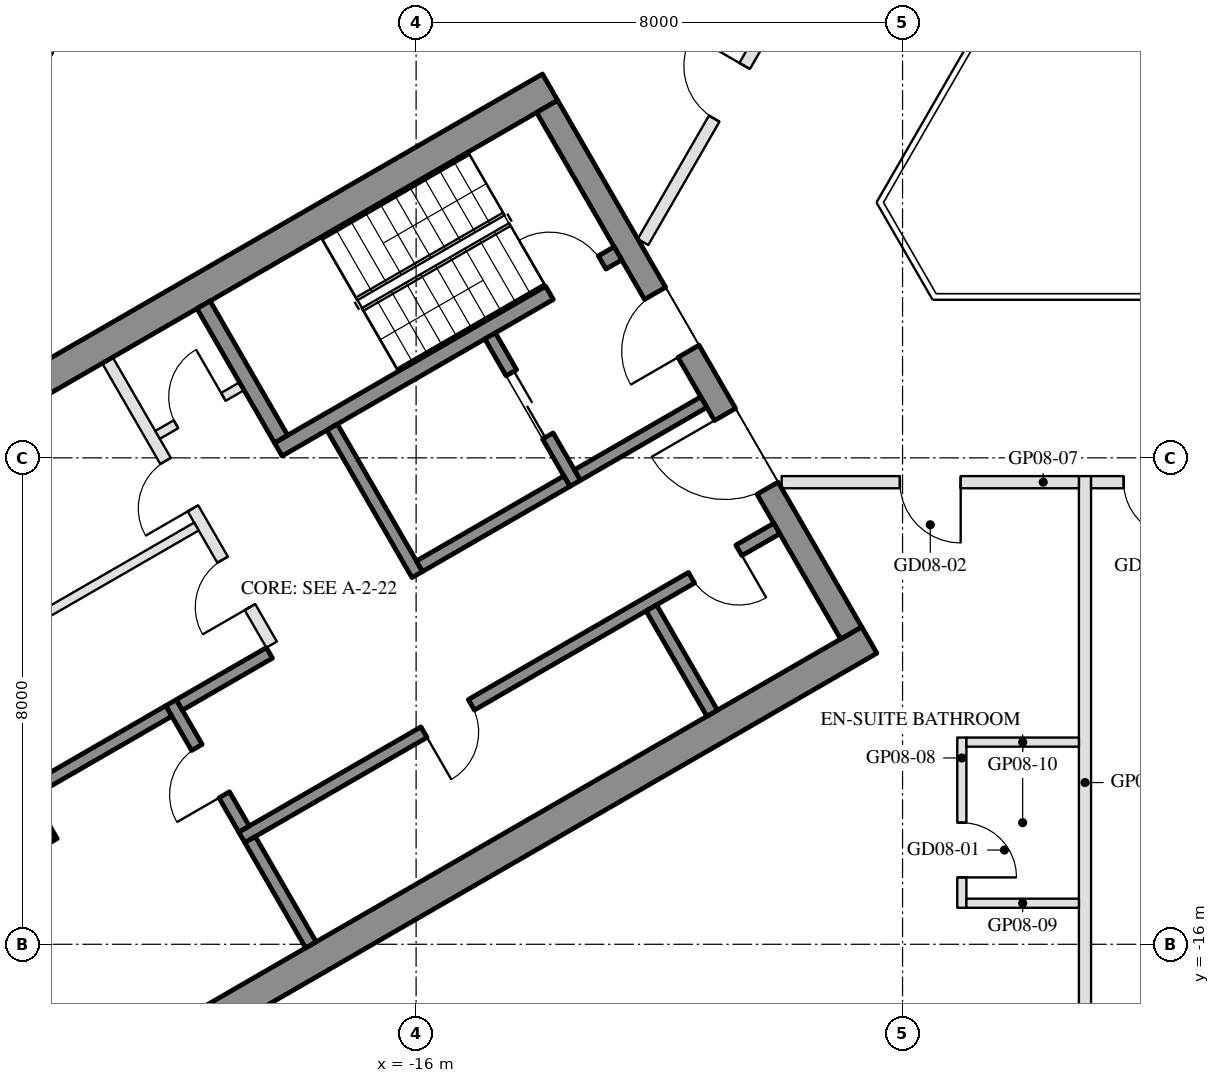
"""IFC4 building model, lengths in metres.
Left out: names, types, materials, properties, quantities, classifications, styles, units other than length and angle.
Written with IfcOpenShell. Run it as: python <this file> out.ifc"""

import sys

from ifc_helpers import new_model, si_unit, direction, frame, frame_2d, origin, origin_2d, place, context, subcontext, project, spatial, rectangle, hollow_rectangle, extrude, element, fill, save


model = new_model("IFC4")
c1 = context("Model", 3, precision=1e-05, world=origin(), true_north=direction((0.0, 1.0)))
c2 = subcontext(c1, "Body", "Model", "MODEL_VIEW")
j1 = project(units=[si_unit("LENGTHUNIT", "METRE"), si_unit("PLANEANGLEUNIT", "RADIAN")], contexts=[c1])
p1 = place(None, origin())
s1 = spatial("IfcSite", under=j1, at=p1, CompositionType="ELEMENT")
p2 = place(p1, origin())
s2 = spatial("IfcBuilding", under=s1, at=p2, CompositionType="ELEMENT")
p3 = place(p2, frame((0.0, 0.0, 102.0)))
s3 = spatial("IfcBuildingStorey", under=s2, at=p3, CompositionType="ELEMENT", Elevation=102.0)
p4 = place(p3, frame((-23.643, -13.65, 0.0), z_axis=(0.0, 0.0, 1.0), x_axis=(-0.5, 0.866025403784, 0.0)))
e1 = element("IfcColumn", 1, at=p4, inside=s3, PredefinedType="COLUMN", context=c2, shape_type="SweptSolid", body=[
    extrude(hollow_rectangle(XDim=2.8, YDim=2.4, WallThickness=0.07, at=origin_2d()), origin(), (0.0, 0.0, 1.0), 3.7),
])
p5 = place(p3, frame((-20.309, 1.934, 0.0), z_axis=(0.0, 0.0, 1.0), x_axis=(-0.499992114976, -0.866029956157, 0.0)))
e2 = element("IfcWall", 2, at=p5, inside=s3, PredefinedType="SOLIDWALL", context=c2, shape_type="SweptSolid", body=[
    extrude(rectangle(XDim=6.74, YDim=0.35, at=frame_2d((3.37, 0.0))), origin(), (0.0, 0.0, 1.0), 3.55),
])
p6 = place(p5, frame((4.02, 0.0, 0.0)))
e3 = element("IfcOpeningElement", 3, at=p6, cuts=e2, PredefinedType="OPENING", context=c2, shape_type="SweptSolid", body=[
    extrude(rectangle(XDim=2.4, YDim=2.4, at=frame_2d((1.2, 1.2))), frame((0.0, 0.185, 0.0), z_axis=(0.0, -1.0, 0.0), x_axis=(1.0, 0.0, 0.0)), (0.0, 0.0, 1.0), 0.37),
])
p7 = place(p5, frame((0.77, 0.0, 0.3)))
e4 = element("IfcOpeningElement", 4, at=p7, cuts=e2, PredefinedType="OPENING", context=c2, shape_type="SweptSolid", body=[
    extrude(rectangle(XDim=2.9, YDim=2.65, at=frame_2d((1.45, 1.325))), frame((0.0, 0.185, 0.0), z_axis=(0.0, -1.0, 0.0), x_axis=(1.0, 0.0, 0.0)), (0.0, 0.0, 1.0), 0.37),
])
for number, where, z_axis, x_axis in (
    (5, (-13.797, -1.903, 0.0), (0.0, 0.0, 1.0), (-0.866, -0.5, 0.0)),
    (6, (-8.547, -10.997, 0.0), (0.0, 0.0, 1.0), (-0.866, -0.5, 0.0)),
):
    element("IfcWall", number, at=place(p3, frame(where, z_axis=z_axis, x_axis=x_axis)), inside=s3, PredefinedType="SHEAR", context=c2, shape_type="SweptSolid", body=[
        extrude(rectangle(XDim=14.837, YDim=0.5, at=frame_2d((7.418, 0.0))), origin(), (0.0, 0.0, 1.0), 3.5),
    ])
p8 = place(p3, frame((-13.845, -2.22, 0.0), z_axis=(0.0, 0.0, 1.0), x_axis=(0.500004234368, -0.866022959057, 0.0)))
e7 = element("IfcWall", 7, at=p8, inside=s3, PredefinedType="SHEAR", context=c2, shape_type="SweptSolid", body=[
    extrude(rectangle(XDim=10.0, YDim=0.4, at=frame_2d((5.0, 0.0))), origin(), (0.0, 0.0, 1.0), 3.5),
])
p9 = place(p8, frame((3.55, 0.0, 0.0)))
e8 = element("IfcOpeningElement", 8, at=p9, cuts=e7, PredefinedType="OPENING", context=c2, shape_type="SweptSolid", body=[
    extrude(rectangle(XDim=1.1, YDim=2.1, at=frame_2d((0.55, 1.05))), frame((0.0, 0.21, 0.0), z_axis=(0.0, -1.0, 0.0), x_axis=(1.0, 0.0, 0.0)), (0.0, 0.0, 1.0), 0.42),
])
p10 = place(p8, frame((5.85, 0.0, 0.0)))
e9 = element("IfcOpeningElement", 9, at=p10, cuts=e7, PredefinedType="OPENING", context=c2, shape_type="SweptSolid", body=[
    extrude(rectangle(XDim=1.4, YDim=2.1, at=frame_2d((0.7, 1.05))), frame((0.0, 0.21, 0.0), z_axis=(0.0, -1.0, 0.0), x_axis=(1.0, 0.0, 0.0)), (0.0, 0.0, 1.0), 0.42),
])
p11 = place(p3, frame((-12.681, -4.636, 0.0), z_axis=(0.0, 0.0, 1.0), x_axis=(-0.866021702275, -0.500006411147, 0.0)))
e10 = element("IfcWall", 10, at=p11, inside=s3, PredefinedType="SHEAR", context=c2, shape_type="SweptSolid", body=[
    extrude(rectangle(XDim=6.45, YDim=0.25, at=frame_2d((3.225, 0.0))), origin(), (0.0, 0.0, 1.0), 3.5),
])
p12 = place(p11, frame((0.3, 0.0, 0.0)))
e11 = element("IfcOpeningElement", 11, at=p12, cuts=e10, PredefinedType="OPENING", context=c2, shape_type="SweptSolid", body=[
    extrude(rectangle(XDim=1.0, YDim=2.1, at=frame_2d((0.5, 1.05))), frame((0.0, 0.135, 0.0), z_axis=(0.0, -1.0, 0.0), x_axis=(1.0, 0.0, 0.0)), (0.0, 0.0, 1.0), 0.27),
])
p13 = place(p3, frame((-19.496, -5.482, 0.0), z_axis=(0.0, 0.0, 1.0), x_axis=(0.499990435942, -0.866030925526, 0.0)))
e12 = element("IfcWall", 12, at=p13, inside=s3, PredefinedType="SHEAR", context=c2, shape_type="SweptSolid", body=[
    extrude(rectangle(XDim=2.55, YDim=0.25, at=frame_2d((1.275, 0.0))), origin(), (0.0, 0.0, 1.0), 3.5),
])
p14 = place(p3, frame((-17.381, -7.495, 0.0), z_axis=(0.0, 0.0, 1.0), x_axis=(0.500011755427, -0.866018616679, 0.0)))
e13 = element("IfcWall", 13, at=p14, inside=s3, PredefinedType="SHEAR", context=c2, shape_type="SweptSolid", body=[
    extrude(rectangle(XDim=2.8, YDim=0.2, at=frame_2d((1.4, 0.0))), origin(), (0.0, 0.0, 1.0), 3.5),
])
p15 = place(p3, frame((-14.783, -5.995, 0.0), z_axis=(0.0, 0.0, 1.0), x_axis=(0.49994636267, -0.866056369097, 0.0)))
e14 = element("IfcWall", 14, at=p15, inside=s3, PredefinedType="SHEAR", context=c2, shape_type="SweptSolid", body=[
    extrude(rectangle(XDim=2.8, YDim=0.2, at=frame_2d((1.4, 0.0))), origin(), (0.0, 0.0, 1.0), 3.5),
])
p16 = place(p15, frame((0.7, 0.0, 0.0)))
e15 = element("IfcOpeningElement", 15, at=p16, cuts=e14, PredefinedType="OPENING", context=c2, shape_type="SweptSolid", body=[
    extrude(rectangle(XDim=1.2, YDim=2.1, at=frame_2d((0.6, 1.05))), frame((0.0, 0.11, 0.0), z_axis=(0.0, -1.0, 0.0), x_axis=(1.0, 0.0, 0.0)), (0.0, 0.0, 1.0), 0.22),
])
p17 = place(p3, frame((-13.52, -8.383, 0.0), z_axis=(0.0, 0.0, 1.0), x_axis=(-0.866034573852, -0.49998411664, 0.0)))
e16 = element("IfcWall", 16, at=p17, inside=s3, PredefinedType="SHEAR", context=c2, shape_type="SweptSolid", body=[
    extrude(rectangle(XDim=2.8, YDim=0.2, at=frame_2d((1.4, 0.0))), origin(), (0.0, 0.0, 1.0), 3.5),
])
p18 = place(p3, frame((-11.268, -7.083, 0.0), z_axis=(0.0, 0.0, 1.0), x_axis=(-0.866050077142, -0.499957262057, 0.0)))
e17 = element("IfcWall", 17, at=p18, inside=s3, PredefinedType="SHEAR", context=c2, shape_type="SweptSolid", body=[
    extrude(rectangle(XDim=2.4, YDim=0.2, at=frame_2d((1.2, 0.0))), origin(), (0.0, 0.0, 1.0), 3.5),
])
p19 = place(p3, frame((-10.068, -9.162, 0.0), z_axis=(0.0, 0.0, 1.0), x_axis=(-0.866032725843, -0.499987317609, 0.0)))
e18 = element("IfcWall", 18, at=p19, inside=s3, PredefinedType="SHEAR", context=c2, shape_type="SweptSolid", body=[
    extrude(rectangle(XDim=10.16, YDim=0.2, at=frame_2d((5.08, 0.0))), origin(), (0.0, 0.0, 1.0), 3.5),
])
p20 = place(p19, frame((0.72, 0.0, 0.0)))
e19 = element("IfcOpeningElement", 19, at=p20, cuts=e18, PredefinedType="OPENING", context=c2, shape_type="SweptSolid", body=[
    extrude(rectangle(XDim=0.9, YDim=2.1, at=frame_2d((0.45, 1.05))), frame((0.0, 0.11, 0.0), z_axis=(0.0, -1.0, 0.0), x_axis=(1.0, 0.0, 0.0)), (0.0, 0.0, 1.0), 0.22),
])
p21 = place(p19, frame((5.8, 0.0, 0.0)))
e20 = element("IfcOpeningElement", 20, at=p21, cuts=e18, PredefinedType="OPENING", context=c2, shape_type="SweptSolid", body=[
    extrude(rectangle(XDim=0.9, YDim=2.1, at=frame_2d((0.45, 1.05))), frame((0.0, 0.11, 0.0), z_axis=(0.0, -1.0, 0.0), x_axis=(1.0, 0.0, 0.0)), (0.0, 0.0, 1.0), 0.22),
])
p22 = place(p3, frame((-20.031, -12.026, 0.0), z_axis=(0.0, 0.0, 1.0), x_axis=(0.500033551112, -0.866006032174, 0.0)))
e21 = element("IfcWall", 21, at=p22, inside=s3, PredefinedType="SHEAR", context=c2, shape_type="SweptSolid", body=[
    extrude(rectangle(XDim=2.4, YDim=0.2, at=frame_2d((1.2, 0.0))), origin(), (0.0, 0.0, 1.0), 3.5),
])
p23 = place(p22, frame((0.85, 0.0, 0.0)))
e22 = element("IfcOpeningElement", 22, at=p23, cuts=e21, PredefinedType="OPENING", context=c2, shape_type="SweptSolid", body=[
    extrude(rectangle(XDim=0.9, YDim=2.1, at=frame_2d((0.45, 1.05))), frame((0.0, 0.11, 0.0), z_axis=(0.0, -1.0, 0.0), x_axis=(1.0, 0.0, 0.0)), (0.0, 0.0, 1.0), 0.22),
])
p24 = place(p3, frame((-18.413, -11.208, 0.0), z_axis=(0.0, 0.0, 1.0), x_axis=(-0.866038183914, -0.499977863513, 0.0)))
e23 = element("IfcWall", 23, at=p24, inside=s3, PredefinedType="SHEAR", context=c2, shape_type="SweptSolid", body=[
    extrude(rectangle(XDim=1.71, YDim=0.2, at=frame_2d((0.855, 0.0))), origin(), (0.0, 0.0, 1.0), 3.5),
])
for number, where, z_axis, x_axis in (
    (24, (-12.131, -10.468, 0.0), (0.0, 0.0, 1.0), (0.5, -0.866, 0.0)),
    (25, (-18.73, -14.278, 0.0), (0.0, 0.0, 1.0), (0.5, -0.866, 0.0)),
):
    element("IfcWall", number, at=place(p3, frame(where, z_axis=z_axis, x_axis=x_axis)), inside=s3, PredefinedType="SHEAR", context=c2, shape_type="SweptSolid", body=[
        extrude(rectangle(XDim=2.0, YDim=0.2, at=frame_2d((1.0, 0.0))), origin(), (0.0, 0.0, 1.0), 3.5),
    ])
p25 = place(p3, frame((-20.067, -12.163, 0.0), z_axis=(0.0, 0.0, 1.0), x_axis=(-0.866060851709, -0.499938597367, 0.0)))
e26 = element("IfcWall", 26, at=p25, inside=s3, PredefinedType="SHEAR", context=c2, shape_type="SweptSolid", body=[
    extrude(rectangle(XDim=2.64, YDim=0.2, at=frame_2d((1.32, 0.0))), origin(), (0.0, 0.0, 1.0), 3.5),
])
p26 = place(p3, frame((-21.076, -6.395, 0.0), z_axis=(0.0, 0.0, 1.0), x_axis=(0.50001468107, -0.866016927499, 0.0)))
e27 = element("IfcWall", 27, at=p26, inside=s3, PredefinedType="PARTITIONING", context=c2, shape_type="SweptSolid", body=[
    extrude(rectangle(XDim=5.4, YDim=0.2, at=frame_2d((2.7, 0.0))), origin(), (0.0, 0.0, 1.0), 3.5),
])
p27 = place(p26, frame((1.913, 0.0, 0.0)))
e28 = element("IfcOpeningElement", 28, at=p27, cuts=e27, PredefinedType="OPENING", context=c2, shape_type="SweptSolid", body=[
    extrude(rectangle(XDim=0.9, YDim=2.1, at=frame_2d((0.45, 1.05))), frame((0.0, 0.11, 0.0), z_axis=(0.0, -1.0, 0.0), x_axis=(1.0, 0.0, 0.0)), (0.0, 0.0, 1.0), 0.22),
])
p28 = place(p26, frame((3.788, 0.0, 0.0)))
e29 = element("IfcOpeningElement", 29, at=p28, cuts=e27, PredefinedType="OPENING", context=c2, shape_type="SweptSolid", body=[
    extrude(rectangle(XDim=0.9, YDim=2.1, at=frame_2d((0.45, 1.05))), frame((0.0, 0.11, 0.0), z_axis=(0.0, -1.0, 0.0), x_axis=(1.0, 0.0, 0.0)), (0.0, 0.0, 1.0), 0.22),
])
p29 = place(p3, frame((-18.866, -6.822, 0.0), z_axis=(0.0, 0.0, 1.0), x_axis=(-0.866028054938, -0.499995408039, 0.0)))
e30 = element("IfcWall", 30, at=p29, inside=s3, PredefinedType="PARTITIONING", context=c2, shape_type="SweptSolid", body=[
    extrude(rectangle(XDim=1.6, YDim=0.15, at=frame_2d((0.8, 0.0))), origin(), (0.0, 0.0, 1.0), 3.5),
])
p30 = place(p29, frame((0.35, 0.0, 0.0)))
e31 = element("IfcOpeningElement", 31, at=p30, cuts=e30, PredefinedType="OPENING", context=c2, shape_type="SweptSolid", body=[
    extrude(rectangle(XDim=0.9, YDim=2.1, at=frame_2d((0.45, 1.05))), frame((0.0, 0.085, 0.0), z_axis=(0.0, -1.0, 0.0), x_axis=(1.0, 0.0, 0.0)), (0.0, 0.0, 1.0), 0.17),
])
p31 = place(p3, frame((-19.613, -9.13, 0.0), z_axis=(0.0, 0.0, 1.0), x_axis=(-0.866031734426, -0.499989034847, 0.0)))
e32 = element("IfcWall", 32, at=p31, inside=s3, PredefinedType="PARTITIONING", context=c2, shape_type="SweptSolid", body=[
    extrude(rectangle(XDim=6.95, YDim=0.15, at=frame_2d((3.475, 0.0))), origin(), (0.0, 0.0, 1.0), 3.5),
])
p32 = place(p3, frame((-5.0, -18.38, 0.0), z_axis=(0.0, 0.0, 1.0), x_axis=(0.0, 1.0, 0.0)))
e33 = element("IfcWall", 33, at=p32, inside=s3, PredefinedType="PARTITIONING", context=c2, shape_type="SweptSolid", body=[
    extrude(rectangle(XDim=10.08, YDim=0.2, at=frame_2d((5.04, 0.0))), origin(), (0.0, 0.0, 1.0), 2.96),
])
p33 = place(p3, frame((-5.1, -8.4, 0.0), z_axis=(0.0, 0.0, 1.0), x_axis=(-1.0, 0.0, 0.0)))
e34 = element("IfcWall", 34, at=p33, inside=s3, PredefinedType="PARTITIONING", context=c2, shape_type="SweptSolid", body=[
    extrude(rectangle(XDim=4.888, YDim=0.2, at=frame_2d((2.444, 0.0))), origin(), (0.0, 0.0, 1.0), 2.95),
])
p34 = place(p33, frame((1.944, 0.0, 0.0)))
e35 = element("IfcOpeningElement", 35, at=p34, cuts=e34, PredefinedType="OPENING", context=c2, shape_type="SweptSolid", body=[
    extrude(rectangle(XDim=1.0, YDim=2.1, at=frame_2d((0.5, 1.05))), frame((0.0, 0.11, 0.0), z_axis=(0.0, -1.0, 0.0), x_axis=(1.0, 0.0, 0.0)), (0.0, 0.0, 1.0), 0.22),
])
p35 = place(p3, frame((-7.025, -12.6, 0.0), z_axis=(0.0, 0.0, 1.0), x_axis=(0.0, -1.0, 0.0)))
e36 = element("IfcWall", 36, at=p35, inside=s3, PredefinedType="PARTITIONING", context=c2, shape_type="SweptSolid", body=[
    extrude(rectangle(XDim=2.8, YDim=0.15, at=frame_2d((1.4, 0.0))), origin(), (0.0, 0.0, 1.0), 3.55),
])
p36 = place(p35, frame((1.4, 0.0, 0.0)))
e37 = element("IfcOpeningElement", 37, at=p36, cuts=e36, PredefinedType="OPENING", context=c2, shape_type="SweptSolid", body=[
    extrude(rectangle(XDim=0.9, YDim=2.1, at=frame_2d((0.45, 1.05))), frame((0.0, 0.085, 0.0), z_axis=(0.0, -1.0, 0.0), x_axis=(1.0, 0.0, 0.0)), (0.0, 0.0, 1.0), 0.17),
])
for number, where, z_axis, x_axis in (
    (38, (-6.95, -15.325, 0.0), (0.0, 0.0, 1.0), (1.0, 0.0, 0.0)),
    (39, (-6.95, -12.675, 0.0), (0.0, 0.0, 1.0), (1.0, 0.0, 0.0)),
):
    element("IfcWall", number, at=place(p3, frame(where, z_axis=z_axis, x_axis=x_axis)), inside=s3, PredefinedType="PARTITIONING", context=c2, shape_type="SweptSolid", body=[
        extrude(rectangle(XDim=1.85, YDim=0.15, at=frame_2d((0.925, 0.0))), origin(), (0.0, 0.0, 1.0), 3.55),
    ])
p37 = place(p3, frame((-2.928, -8.4, 0.0), z_axis=(0.0, 0.0, 1.0), x_axis=(-1.0, 0.0, 0.0)))
e40 = element("IfcWall", 40, at=p37, inside=s3, PredefinedType="PARTITIONING", context=c2, shape_type="SweptSolid", body=[
    extrude(rectangle(XDim=1.972, YDim=0.2, at=frame_2d((0.986, 0.0))), origin(), (0.0, 0.0, 1.0), 2.95),
])
p38 = place(p37, frame((0.536, 0.0, 0.0)))
e41 = element("IfcOpeningElement", 41, at=p38, cuts=e40, PredefinedType="OPENING", context=c2, shape_type="SweptSolid", body=[
    extrude(rectangle(XDim=0.9, YDim=2.1, at=frame_2d((0.45, 1.05))), frame((0.0, 0.11, 0.0), z_axis=(0.0, -1.0, 0.0), x_axis=(1.0, 0.0, 0.0)), (0.0, 0.0, 1.0), 0.22),
])
p39 = place(p3, frame((-12.269, -4.45, 0.0), z_axis=(0.0, 0.0, 1.0), x_axis=(0.50001360338, 0.866017549727, 0.0)))
e42 = element("IfcWall", 42, at=p39, inside=s3, PredefinedType="PARTITIONING", context=c2, shape_type="SweptSolid", body=[
    extrude(rectangle(XDim=5.686, YDim=0.2, at=frame_2d((2.843, 0.0))), origin(), (0.0, 0.0, 1.0), 2.95),
])
p40 = place(p39, frame((2.343, 0.0, 0.0)))
e43 = element("IfcOpeningElement", 43, at=p40, cuts=e42, PredefinedType="OPENING", context=c2, shape_type="SweptSolid", body=[
    extrude(rectangle(XDim=1.0, YDim=2.1, at=frame_2d((0.5, 1.05))), frame((0.0, 0.11, 0.0), z_axis=(0.0, -1.0, 0.0), x_axis=(1.0, 0.0, 0.0)), (0.0, 0.0, 1.0), 0.22),
])
p41 = place(p16, origin())
e44 = element("IfcDoor", 44, at=p41, inside=s3, OperationType="DOUBLE_DOOR_SLIDING", PredefinedType="DOOR", context=c2, shape_type="SweptSolid", body=[
    extrude(rectangle(XDim=1.2, YDim=2.1, at=frame_2d((0.6, 1.05))), frame((0.0, 0.025, 0.0), z_axis=(0.0, -1.0, 0.0), x_axis=(1.0, 0.0, 0.0)), (0.0, 0.0, 1.0), 0.05),
])
fill(e15, e44)
p42 = place(p30, frame((0.9, 0.0, 0.0), z_axis=(0.0, 0.0, 1.0), x_axis=(-1.0, 0.0, 0.0)))
e45 = element("IfcDoor", 45, at=p42, inside=s3, OperationType="SINGLE_SWING_RIGHT", PredefinedType="DOOR", context=c2, shape_type="SweptSolid", body=[
    extrude(rectangle(XDim=0.9, YDim=2.1, at=frame_2d((0.45, 1.05))), frame((0.0, 0.025, 0.0), z_axis=(0.0, -1.0, 0.0), x_axis=(1.0, 0.0, 0.0)), (0.0, 0.0, 1.0), 0.05),
])
fill(e31, e45)
p43 = place(p20, origin())
e46 = element("IfcDoor", 46, at=p43, inside=s3, OperationType="SINGLE_SWING_LEFT", PredefinedType="DOOR", context=c2, shape_type="SweptSolid", body=[
    extrude(rectangle(XDim=0.9, YDim=2.1, at=frame_2d((0.45, 1.05))), frame((0.0, 0.025, 0.0), z_axis=(0.0, -1.0, 0.0), x_axis=(1.0, 0.0, 0.0)), (0.0, 0.0, 1.0), 0.05),
])
fill(e19, e46)
p44 = place(p21, origin())
e47 = element("IfcDoor", 47, at=p44, inside=s3, OperationType="SINGLE_SWING_RIGHT", PredefinedType="DOOR", context=c2, shape_type="SweptSolid", body=[
    extrude(rectangle(XDim=0.9, YDim=2.1, at=frame_2d((0.45, 1.05))), frame((0.0, 0.025, 0.0), z_axis=(0.0, -1.0, 0.0), x_axis=(1.0, 0.0, 0.0)), (0.0, 0.0, 1.0), 0.05),
])
fill(e20, e47)
p45 = place(p23, frame((0.9, 0.0, 0.0), z_axis=(0.0, 0.0, 1.0), x_axis=(-1.0, 0.0, 0.0)))
e48 = element("IfcDoor", 48, at=p45, inside=s3, OperationType="SINGLE_SWING_LEFT", PredefinedType="DOOR", context=c2, shape_type="SweptSolid", body=[
    extrude(rectangle(XDim=0.9, YDim=2.1, at=frame_2d((0.45, 1.05))), frame((0.0, 0.025, 0.0), z_axis=(0.0, -1.0, 0.0), x_axis=(1.0, 0.0, 0.0)), (0.0, 0.0, 1.0), 0.05),
])
fill(e22, e48)
p46 = place(p27, frame((0.9, 0.0, 0.0), z_axis=(0.0, 0.0, 1.0), x_axis=(-1.0, 0.0, 0.0)))
e49 = element("IfcDoor", 49, at=p46, inside=s3, OperationType="SINGLE_SWING_LEFT", PredefinedType="DOOR", context=c2, shape_type="SweptSolid", body=[
    extrude(rectangle(XDim=0.9, YDim=2.1, at=frame_2d((0.45, 1.05))), frame((0.0, 0.025, 0.0), z_axis=(0.0, -1.0, 0.0), x_axis=(1.0, 0.0, 0.0)), (0.0, 0.0, 1.0), 0.05),
])
fill(e28, e49)
p47 = place(p28, frame((0.9, 0.0, 0.0), z_axis=(0.0, 0.0, 1.0), x_axis=(-1.0, 0.0, 0.0)))
e50 = element("IfcDoor", 50, at=p47, inside=s3, OperationType="SINGLE_SWING_LEFT", PredefinedType="DOOR", context=c2, shape_type="SweptSolid", body=[
    extrude(rectangle(XDim=0.9, YDim=2.1, at=frame_2d((0.45, 1.05))), frame((0.0, 0.025, 0.0), z_axis=(0.0, -1.0, 0.0), x_axis=(1.0, 0.0, 0.0)), (0.0, 0.0, 1.0), 0.05),
])
fill(e29, e50)
p48 = place(p9, frame((1.1, 0.0, 0.0), z_axis=(0.0, 0.0, 1.0), x_axis=(-1.0, 0.0, 0.0)))
e51 = element("IfcDoor", 51, at=p48, inside=s3, OperationType="SINGLE_SWING_LEFT", PredefinedType="DOOR", context=c2, shape_type="SweptSolid", body=[
    extrude(rectangle(XDim=1.1, YDim=2.1, at=frame_2d((0.55, 1.05))), frame((0.0, 0.025, 0.0), z_axis=(0.0, -1.0, 0.0), x_axis=(1.0, 0.0, 0.0)), (0.0, 0.0, 1.0), 0.05),
])
fill(e8, e51)
p49 = place(p10, frame((1.4, 0.0, 0.0), z_axis=(0.0, 0.0, 1.0), x_axis=(-1.0, 0.0, 0.0)))
e52 = element("IfcDoor", 52, at=p49, inside=s3, OperationType="DOUBLE_DOOR_SINGLE_SWING", PredefinedType="DOOR", context=c2, shape_type="SweptSolid", body=[
    extrude(rectangle(XDim=1.4, YDim=2.1, at=frame_2d((0.7, 1.05))), frame((0.0, 0.025, 0.0), z_axis=(0.0, -1.0, 0.0), x_axis=(1.0, 0.0, 0.0)), (0.0, 0.0, 1.0), 0.05),
])
fill(e9, e52)
p50 = place(p12, frame((1.0, 0.0, 0.0), z_axis=(0.0, 0.0, 1.0), x_axis=(-1.0, 0.0, 0.0)))
e53 = element("IfcDoor", 53, at=p50, inside=s3, OperationType="SINGLE_SWING_LEFT", PredefinedType="DOOR", context=c2, shape_type="SweptSolid", body=[
    extrude(rectangle(XDim=1.0, YDim=2.1, at=frame_2d((0.5, 1.05))), frame((0.0, 0.025, 0.0), z_axis=(0.0, -1.0, 0.0), x_axis=(1.0, 0.0, 0.0)), (0.0, 0.0, 1.0), 0.05),
])
fill(e11, e53)
p51 = place(p36, origin())
e54 = element("IfcDoor", 54, at=p51, inside=s3, OperationType="SINGLE_SWING_RIGHT", PredefinedType="DOOR", context=c2, shape_type="SweptSolid", body=[
    extrude(rectangle(XDim=0.9, YDim=2.1, at=frame_2d((0.45, 1.05))), frame((0.0, 0.025, 0.0), z_axis=(0.0, -1.0, 0.0), x_axis=(1.0, 0.0, 0.0)), (0.0, 0.0, 1.0), 0.05),
])
fill(e37, e54)
p52 = place(p34, origin())
e55 = element("IfcDoor", 55, at=p52, inside=s3, OperationType="SINGLE_SWING_LEFT", PredefinedType="DOOR", context=c2, shape_type="SweptSolid", body=[
    extrude(rectangle(XDim=1.0, YDim=2.1, at=frame_2d((0.5, 1.05))), frame((0.0, 0.025, 0.0), z_axis=(0.0, -1.0, 0.0), x_axis=(1.0, 0.0, 0.0)), (0.0, 0.0, 1.0), 0.05),
])
fill(e35, e55)
p53 = place(p38, origin())
e56 = element("IfcDoor", 56, at=p53, inside=s3, OperationType="SINGLE_SWING_LEFT", PredefinedType="DOOR", context=c2, shape_type="SweptSolid", body=[
    extrude(rectangle(XDim=0.9, YDim=2.1, at=frame_2d((0.45, 1.05))), frame((0.0, 0.025, 0.0), z_axis=(0.0, -1.0, 0.0), x_axis=(1.0, 0.0, 0.0)), (0.0, 0.0, 1.0), 0.05),
])
fill(e41, e56)
p54 = place(p40, origin())
e57 = element("IfcDoor", 57, at=p54, inside=s3, OperationType="SINGLE_SWING_RIGHT", PredefinedType="DOOR", context=c2, shape_type="SweptSolid", body=[
    extrude(rectangle(XDim=1.0, YDim=2.1, at=frame_2d((0.5, 1.05))), frame((0.0, 0.025, 0.0), z_axis=(0.0, -1.0, 0.0), x_axis=(1.0, 0.0, 0.0)), (0.0, 0.0, 1.0), 0.05),
])
fill(e43, e57)
save(model, sys.argv[1])
